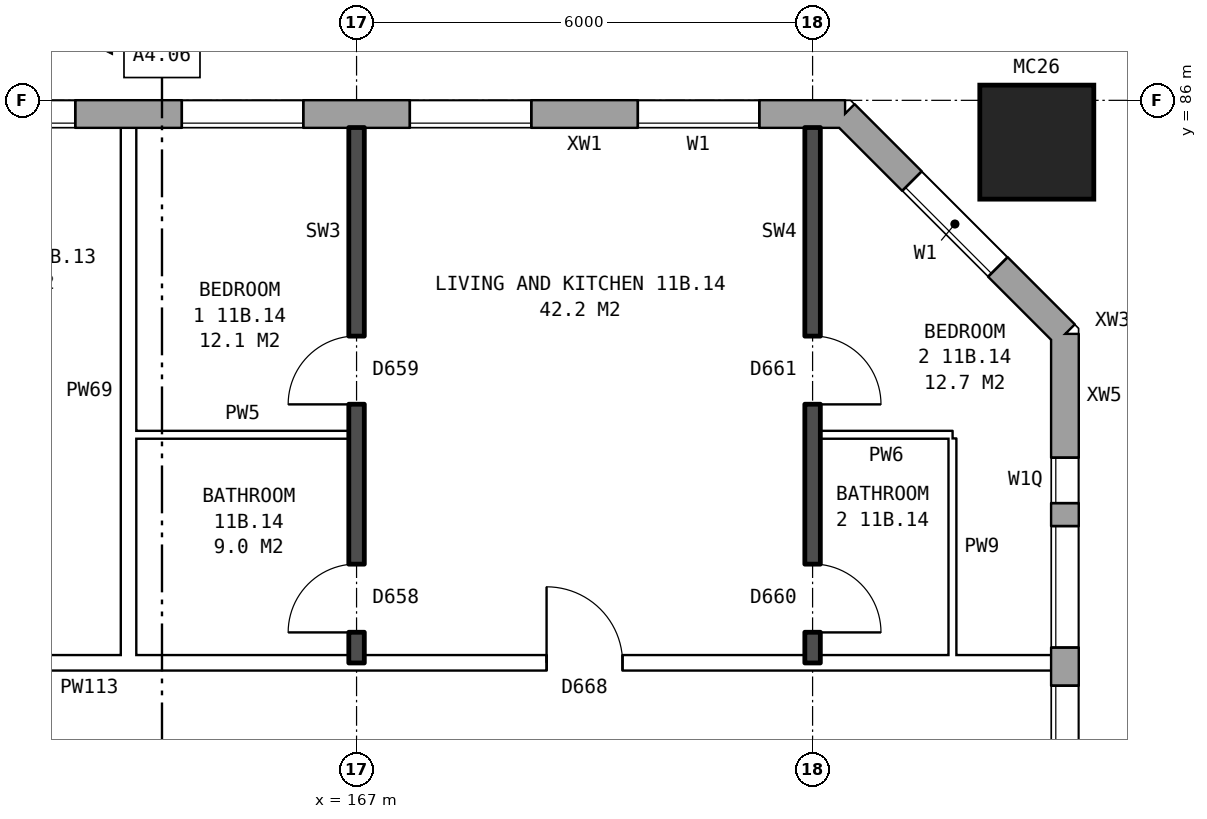
"""IFC4 building model, lengths in metres.
Left out: names, types, materials, properties, quantities, classifications, styles, units other than length and angle.
Written with IfcOpenShell. Run it as: python <this file> out.ifc"""

import sys

from ifc_helpers import new_model, si_unit, direction, frame, frame_2d, origin, origin_2d, place, context, subcontext, project, spatial, rectangle, hollow_rectangle, extrude, element, fill, save


model = new_model("IFC4")
c1 = context("Model", 3, precision=1e-05, world=origin(), true_north=direction((0.0, 1.0)))
c2 = subcontext(c1, "Body", "Model", "MODEL_VIEW")
j1 = project(units=[si_unit("LENGTHUNIT", "METRE"), si_unit("PLANEANGLEUNIT", "RADIAN")], contexts=[c1])
p1 = place(None, origin())
s1 = spatial("IfcSite", under=j1, at=p1, CompositionType="ELEMENT")
p2 = place(p1, origin())
s2 = spatial("IfcBuilding", under=s1, at=p2, CompositionType="ELEMENT")
p3 = place(p2, frame((0.0, 0.0, 44.3)))
s3 = spatial("IfcBuildingStorey", under=s2, at=p3, CompositionType="ELEMENT", Elevation=44.3)
p4 = place(p3, frame((175.95, 85.45, 0.0), z_axis=(0.0, 0.0, 1.0), x_axis=(1.0, 0.0, 0.0)))
e1 = element("IfcColumn", 1, at=p4, inside=s3, PredefinedType="COLUMN", context=c2, shape_type="SweptSolid", body=[
    extrude(hollow_rectangle(XDim=1.5, YDim=1.5, WallThickness=0.08, at=origin_2d()), origin(), (0.0, 0.0, 1.0), 3.1),
])
p5 = place(p3, frame((176.32, 57.075, 0.0), z_axis=(0.0, 0.0, 1.0), x_axis=(0.0, 1.0, 0.0)))
e2 = element("IfcWall", 2, at=p5, inside=s3, PredefinedType="STANDARD", context=c2, shape_type="SweptSolid", body=[
    extrude(rectangle(XDim=25.851, YDim=0.36, at=frame_2d((12.925, 0.0))), origin(), (0.0, 0.0, 1.0), 2.85),
])
p6 = place(p5, frame((0.95, 0.0, 0.8)))
e3 = element("IfcOpeningElement", 3, at=p6, cuts=e2, PredefinedType="OPENING", context=c2, shape_type="SweptSolid", body=[
    extrude(rectangle(XDim=1.2, YDim=0.9, at=frame_2d((0.6, 0.45))), frame((0.0, 0.19, 0.0), z_axis=(0.0, -1.0, 0.0), x_axis=(1.0, 0.0, 0.0)), (0.0, 0.0, 1.0), 0.38),
])
p7 = place(p5, frame((4.625, 0.0, 0.8)))
e4 = element("IfcOpeningElement", 4, at=p7, cuts=e2, PredefinedType="OPENING", context=c2, shape_type="SweptSolid", body=[
    extrude(rectangle(XDim=1.6, YDim=1.8, at=frame_2d((0.8, 0.9))), frame((0.0, 0.19, 0.0), z_axis=(0.0, -1.0, 0.0), x_axis=(1.0, 0.0, 0.0)), (0.0, 0.0, 1.0), 0.38),
])
p8 = place(p5, frame((7.625, 0.0, 0.8)))
e5 = element("IfcOpeningElement", 5, at=p8, cuts=e2, PredefinedType="OPENING", context=c2, shape_type="SweptSolid", body=[
    extrude(rectangle(XDim=1.6, YDim=1.8, at=frame_2d((0.8, 0.9))), frame((0.0, 0.19, 0.0), z_axis=(0.0, -1.0, 0.0), x_axis=(1.0, 0.0, 0.0)), (0.0, 0.0, 1.0), 0.38),
])
p9 = place(p5, frame((10.625, 0.0, 0.8)))
e6 = element("IfcOpeningElement", 6, at=p9, cuts=e2, PredefinedType="OPENING", context=c2, shape_type="SweptSolid", body=[
    extrude(rectangle(XDim=1.6, YDim=1.8, at=frame_2d((0.8, 0.9))), frame((0.0, 0.19, 0.0), z_axis=(0.0, -1.0, 0.0), x_axis=(1.0, 0.0, 0.0)), (0.0, 0.0, 1.0), 0.38),
])
p10 = place(p5, frame((13.625, 0.0, 0.8)))
e7 = element("IfcOpeningElement", 7, at=p10, cuts=e2, PredefinedType="OPENING", context=c2, shape_type="SweptSolid", body=[
    extrude(rectangle(XDim=1.6, YDim=1.8, at=frame_2d((0.8, 0.9))), frame((0.0, 0.19, 0.0), z_axis=(0.0, -1.0, 0.0), x_axis=(1.0, 0.0, 0.0)), (0.0, 0.0, 1.0), 0.38),
])
p11 = place(p5, frame((16.625, 0.0, 0.8)))
e8 = element("IfcOpeningElement", 8, at=p11, cuts=e2, PredefinedType="OPENING", context=c2, shape_type="SweptSolid", body=[
    extrude(rectangle(XDim=1.6, YDim=1.8, at=frame_2d((0.8, 0.9))), frame((0.0, 0.19, 0.0), z_axis=(0.0, -1.0, 0.0), x_axis=(1.0, 0.0, 0.0)), (0.0, 0.0, 1.0), 0.38),
])
p12 = place(p5, frame((19.625, 0.0, 0.8)))
e9 = element("IfcOpeningElement", 9, at=p12, cuts=e2, PredefinedType="OPENING", context=c2, shape_type="SweptSolid", body=[
    extrude(rectangle(XDim=1.6, YDim=1.8, at=frame_2d((0.8, 0.9))), frame((0.0, 0.19, 0.0), z_axis=(0.0, -1.0, 0.0), x_axis=(1.0, 0.0, 0.0)), (0.0, 0.0, 1.0), 0.38),
])
p13 = place(p5, frame((21.725, 0.0, 0.8)))
e10 = element("IfcOpeningElement", 10, at=p13, cuts=e2, PredefinedType="OPENING", context=c2, shape_type="SweptSolid", body=[
    extrude(rectangle(XDim=1.6, YDim=1.8, at=frame_2d((0.8, 0.9))), frame((0.0, 0.19, 0.0), z_axis=(0.0, -1.0, 0.0), x_axis=(1.0, 0.0, 0.0)), (0.0, 0.0, 1.0), 0.38),
])
p14 = place(p5, frame((2.5, 0.0, 0.8)))
e11 = element("IfcOpeningElement", 11, at=p14, cuts=e2, PredefinedType="OPENING", context=c2, shape_type="SweptSolid", body=[
    extrude(rectangle(XDim=1.4, YDim=1.8, at=frame_2d((0.7, 0.9))), frame((0.0, 0.19, 0.0), z_axis=(0.0, -1.0, 0.0), x_axis=(1.0, 0.0, 0.0)), (0.0, 0.0, 1.0), 0.38),
])
p15 = place(p5, frame((23.625, 0.0, 0.8)))
e12 = element("IfcOpeningElement", 12, at=p15, cuts=e2, PredefinedType="OPENING", context=c2, shape_type="SweptSolid", body=[
    extrude(rectangle(XDim=0.6, YDim=1.2, at=frame_2d((0.3, 0.6))), frame((0.0, 0.19, 0.0), z_axis=(0.0, -1.0, 0.0), x_axis=(1.0, 0.0, 0.0)), (0.0, 0.0, 1.0), 0.38),
])
p16 = place(p3, frame((176.32, 82.925, 0.0), z_axis=(0.0, 0.0, 1.0), x_axis=(-0.707106781187, 0.707106781187, 0.0)))
e13 = element("IfcWall", 13, at=p16, inside=s3, PredefinedType="STANDARD", context=c2, shape_type="SweptSolid", body=[
    extrude(rectangle(XDim=4.094, YDim=0.36, at=frame_2d((2.047, 0.0))), origin(), (0.0, 0.0, 1.0), 2.85),
])
p17 = place(p16, frame((1.247, 0.0, 0.8)))
e14 = element("IfcOpeningElement", 14, at=p17, cuts=e13, PredefinedType="OPENING", context=c2, shape_type="SweptSolid", body=[
    extrude(rectangle(XDim=1.6, YDim=1.8, at=frame_2d((0.8, 0.9))), frame((0.0, 0.19, 0.0), z_axis=(0.0, -1.0, 0.0), x_axis=(1.0, 0.0, 0.0)), (0.0, 0.0, 1.0), 0.38),
])
p18 = place(p3, frame((173.425, 85.82, 0.0), z_axis=(0.0, 0.0, 1.0), x_axis=(-1.0, 0.0, 0.0)))
e15 = element("IfcWall", 15, at=p18, inside=s3, PredefinedType="STANDARD", context=c2, shape_type="SweptSolid", body=[
    extrude(rectangle(XDim=39.351, YDim=0.36, at=frame_2d((19.675, 0.0))), origin(), (0.0, 0.0, 1.0), 2.85),
])
p19 = place(p18, frame((1.125, 0.0, 0.8)))
e16 = element("IfcOpeningElement", 16, at=p19, cuts=e15, PredefinedType="OPENING", context=c2, shape_type="SweptSolid", body=[
    extrude(rectangle(XDim=1.6, YDim=1.8, at=frame_2d((0.8, 0.9))), frame((0.0, 0.19, 0.0), z_axis=(0.0, -1.0, 0.0), x_axis=(1.0, 0.0, 0.0)), (0.0, 0.0, 1.0), 0.38),
])
p20 = place(p18, frame((4.125, 0.0, 0.8)))
e17 = element("IfcOpeningElement", 17, at=p20, cuts=e15, PredefinedType="OPENING", context=c2, shape_type="SweptSolid", body=[
    extrude(rectangle(XDim=1.6, YDim=1.8, at=frame_2d((0.8, 0.9))), frame((0.0, 0.19, 0.0), z_axis=(0.0, -1.0, 0.0), x_axis=(1.0, 0.0, 0.0)), (0.0, 0.0, 1.0), 0.38),
])
p21 = place(p18, frame((7.125, 0.0, 0.8)))
e18 = element("IfcOpeningElement", 18, at=p21, cuts=e15, PredefinedType="OPENING", context=c2, shape_type="SweptSolid", body=[
    extrude(rectangle(XDim=1.6, YDim=1.8, at=frame_2d((0.8, 0.9))), frame((0.0, 0.19, 0.0), z_axis=(0.0, -1.0, 0.0), x_axis=(1.0, 0.0, 0.0)), (0.0, 0.0, 1.0), 0.38),
])
p22 = place(p18, frame((10.125, 0.0, 0.8)))
e19 = element("IfcOpeningElement", 19, at=p22, cuts=e15, PredefinedType="OPENING", context=c2, shape_type="SweptSolid", body=[
    extrude(rectangle(XDim=1.6, YDim=1.8, at=frame_2d((0.8, 0.9))), frame((0.0, 0.19, 0.0), z_axis=(0.0, -1.0, 0.0), x_axis=(1.0, 0.0, 0.0)), (0.0, 0.0, 1.0), 0.38),
])
p23 = place(p18, frame((13.125, 0.0, 0.8)))
e20 = element("IfcOpeningElement", 20, at=p23, cuts=e15, PredefinedType="OPENING", context=c2, shape_type="SweptSolid", body=[
    extrude(rectangle(XDim=1.6, YDim=1.8, at=frame_2d((0.8, 0.9))), frame((0.0, 0.19, 0.0), z_axis=(0.0, -1.0, 0.0), x_axis=(1.0, 0.0, 0.0)), (0.0, 0.0, 1.0), 0.38),
])
p24 = place(p18, frame((16.125, 0.0, 0.8)))
e21 = element("IfcOpeningElement", 21, at=p24, cuts=e15, PredefinedType="OPENING", context=c2, shape_type="SweptSolid", body=[
    extrude(rectangle(XDim=1.6, YDim=1.8, at=frame_2d((0.8, 0.9))), frame((0.0, 0.19, 0.0), z_axis=(0.0, -1.0, 0.0), x_axis=(1.0, 0.0, 0.0)), (0.0, 0.0, 1.0), 0.38),
])
p25 = place(p18, frame((19.125, 0.0, 0.8)))
e22 = element("IfcOpeningElement", 22, at=p25, cuts=e15, PredefinedType="OPENING", context=c2, shape_type="SweptSolid", body=[
    extrude(rectangle(XDim=1.6, YDim=1.8, at=frame_2d((0.8, 0.9))), frame((0.0, 0.19, 0.0), z_axis=(0.0, -1.0, 0.0), x_axis=(1.0, 0.0, 0.0)), (0.0, 0.0, 1.0), 0.38),
])
p26 = place(p18, frame((22.125, 0.0, 0.8)))
e23 = element("IfcOpeningElement", 23, at=p26, cuts=e15, PredefinedType="OPENING", context=c2, shape_type="SweptSolid", body=[
    extrude(rectangle(XDim=1.6, YDim=1.8, at=frame_2d((0.8, 0.9))), frame((0.0, 0.19, 0.0), z_axis=(0.0, -1.0, 0.0), x_axis=(1.0, 0.0, 0.0)), (0.0, 0.0, 1.0), 0.38),
])
p27 = place(p18, frame((25.125, 0.0, 0.8)))
e24 = element("IfcOpeningElement", 24, at=p27, cuts=e15, PredefinedType="OPENING", context=c2, shape_type="SweptSolid", body=[
    extrude(rectangle(XDim=1.6, YDim=1.8, at=frame_2d((0.8, 0.9))), frame((0.0, 0.19, 0.0), z_axis=(0.0, -1.0, 0.0), x_axis=(1.0, 0.0, 0.0)), (0.0, 0.0, 1.0), 0.38),
])
p28 = place(p18, frame((28.125, 0.0, 0.8)))
e25 = element("IfcOpeningElement", 25, at=p28, cuts=e15, PredefinedType="OPENING", context=c2, shape_type="SweptSolid", body=[
    extrude(rectangle(XDim=1.6, YDim=1.8, at=frame_2d((0.8, 0.9))), frame((0.0, 0.19, 0.0), z_axis=(0.0, -1.0, 0.0), x_axis=(1.0, 0.0, 0.0)), (0.0, 0.0, 1.0), 0.38),
])
p29 = place(p18, frame((31.125, 0.0, 0.8)))
e26 = element("IfcOpeningElement", 26, at=p29, cuts=e15, PredefinedType="OPENING", context=c2, shape_type="SweptSolid", body=[
    extrude(rectangle(XDim=1.6, YDim=1.8, at=frame_2d((0.8, 0.9))), frame((0.0, 0.19, 0.0), z_axis=(0.0, -1.0, 0.0), x_axis=(1.0, 0.0, 0.0)), (0.0, 0.0, 1.0), 0.38),
])
p30 = place(p18, frame((34.125, 0.0, 0.8)))
e27 = element("IfcOpeningElement", 27, at=p30, cuts=e15, PredefinedType="OPENING", context=c2, shape_type="SweptSolid", body=[
    extrude(rectangle(XDim=1.6, YDim=1.8, at=frame_2d((0.8, 0.9))), frame((0.0, 0.19, 0.0), z_axis=(0.0, -1.0, 0.0), x_axis=(1.0, 0.0, 0.0)), (0.0, 0.0, 1.0), 0.38),
])
p31 = place(p18, frame((36.625, 0.0, 0.8)))
e28 = element("IfcOpeningElement", 28, at=p31, cuts=e15, PredefinedType="OPENING", context=c2, shape_type="SweptSolid", body=[
    extrude(rectangle(XDim=1.4, YDim=1.8, at=frame_2d((0.7, 0.9))), frame((0.0, 0.19, 0.0), z_axis=(0.0, -1.0, 0.0), x_axis=(1.0, 0.0, 0.0)), (0.0, 0.0, 1.0), 0.38),
])
p32 = place(p18, frame((38.325, 0.0, 0.8)))
e29 = element("IfcOpeningElement", 29, at=p32, cuts=e15, PredefinedType="OPENING", context=c2, shape_type="SweptSolid", body=[
    extrude(rectangle(XDim=0.6, YDim=0.9, at=frame_2d((0.3, 0.45))), frame((0.0, 0.19, 0.0), z_axis=(0.0, -1.0, 0.0), x_axis=(1.0, 0.0, 0.0)), (0.0, 0.0, 1.0), 0.38),
])
p33 = place(p3, frame((155.1, 78.6, 0.0), z_axis=(0.0, 0.0, 1.0), x_axis=(1.0, 0.0, 0.0)))
e30 = element("IfcWall", 30, at=p33, inside=s3, PredefinedType="PARTITIONING", context=c2, shape_type="SweptSolid", body=[
    extrude(rectangle(XDim=21.04, YDim=0.2, at=frame_2d((10.52, 0.0))), origin(), (0.0, 0.0, 1.0), 2.85),
])
p34 = place(p33, frame((2.45, 0.0, 0.0)))
e31 = element("IfcOpeningElement", 31, at=p34, cuts=e30, PredefinedType="OPENING", context=c2, shape_type="SweptSolid", body=[
    extrude(rectangle(XDim=1.0, YDim=2.1, at=frame_2d((0.5, 1.05))), frame((0.0, 0.11, 0.0), z_axis=(0.0, -1.0, 0.0), x_axis=(1.0, 0.0, 0.0)), (0.0, 0.0, 1.0), 0.22),
])
p35 = place(p33, frame((14.4, 0.0, 0.0)))
e32 = element("IfcOpeningElement", 32, at=p35, cuts=e30, PredefinedType="OPENING", context=c2, shape_type="SweptSolid", body=[
    extrude(rectangle(XDim=1.0, YDim=2.1, at=frame_2d((0.5, 1.05))), frame((0.0, 0.11, 0.0), z_axis=(0.0, -1.0, 0.0), x_axis=(1.0, 0.0, 0.0)), (0.0, 0.0, 1.0), 0.22),
])
p36 = place(p3, frame((164.1, 81.6, 0.0), z_axis=(0.0, 0.0, 1.0), x_axis=(1.0, 0.0, 0.0)))
e33 = element("IfcWall", 33, at=p36, inside=s3, PredefinedType="PARTITIONING", context=c2, shape_type="SweptSolid", body=[
    extrude(rectangle(XDim=2.8, YDim=0.1, at=frame_2d((1.4, 0.0))), origin(), (0.0, 0.0, 1.0), 2.85),
])
p37 = place(p3, frame((173.1, 81.6, 0.0), z_axis=(0.0, 0.0, 1.0), x_axis=(1.0, 0.0, 0.0)))
e34 = element("IfcWall", 34, at=p37, inside=s3, PredefinedType="PARTITIONING", context=c2, shape_type="SweptSolid", body=[
    extrude(rectangle(XDim=1.74, YDim=0.1, at=frame_2d((0.87, 0.0))), origin(), (0.0, 0.0, 1.0), 2.85),
])
p38 = place(p3, frame((164.0, 78.7, 0.0), z_axis=(0.0, 0.0, 1.0), x_axis=(0.0, 1.0, 0.0)))
e35 = element("IfcWall", 35, at=p38, inside=s3, PredefinedType="PARTITIONING", context=c2, shape_type="SweptSolid", body=[
    extrude(rectangle(XDim=6.94, YDim=0.2, at=frame_2d((3.47, 0.0))), origin(), (0.0, 0.0, 1.0), 2.85),
])
p39 = place(p3, frame((167.0, 78.6, 0.0), z_axis=(0.0, 0.0, 1.0), x_axis=(0.0, 1.0, 0.0)))
e36 = element("IfcWall", 36, at=p39, inside=s3, PredefinedType="SOLIDWALL", context=c2, shape_type="SweptSolid", body=[
    extrude(rectangle(XDim=7.04, YDim=0.2, at=frame_2d((3.52, 0.0))), origin(), (0.0, 0.0, 1.0), 2.85),
])
p40 = place(p39, frame((3.4, 0.0, 0.0)))
e37 = element("IfcOpeningElement", 37, at=p40, cuts=e36, PredefinedType="OPENING", context=c2, shape_type="SweptSolid", body=[
    extrude(rectangle(XDim=0.9, YDim=2.1, at=frame_2d((0.45, 1.05))), frame((0.0, 0.11, 0.0), z_axis=(0.0, -1.0, 0.0), x_axis=(1.0, 0.0, 0.0)), (0.0, 0.0, 1.0), 0.22),
])
p41 = place(p39, frame((0.4, 0.0, 0.0)))
e38 = element("IfcOpeningElement", 38, at=p41, cuts=e36, PredefinedType="OPENING", context=c2, shape_type="SweptSolid", body=[
    extrude(rectangle(XDim=0.9, YDim=2.1, at=frame_2d((0.45, 1.05))), frame((0.0, 0.11, 0.0), z_axis=(0.0, -1.0, 0.0), x_axis=(1.0, 0.0, 0.0)), (0.0, 0.0, 1.0), 0.22),
])
p42 = place(p3, frame((173.0, 78.6, 0.0), z_axis=(0.0, 0.0, 1.0), x_axis=(0.0, 1.0, 0.0)))
e39 = element("IfcWall", 39, at=p42, inside=s3, PredefinedType="SOLIDWALL", context=c2, shape_type="SweptSolid", body=[
    extrude(rectangle(XDim=7.04, YDim=0.2, at=frame_2d((3.52, 0.0))), origin(), (0.0, 0.0, 1.0), 2.85),
])
p43 = place(p42, frame((3.4, 0.0, 0.0)))
e40 = element("IfcOpeningElement", 40, at=p43, cuts=e39, PredefinedType="OPENING", context=c2, shape_type="SweptSolid", body=[
    extrude(rectangle(XDim=0.9, YDim=2.1, at=frame_2d((0.45, 1.05))), frame((0.0, 0.11, 0.0), z_axis=(0.0, -1.0, 0.0), x_axis=(1.0, 0.0, 0.0)), (0.0, 0.0, 1.0), 0.22),
])
p44 = place(p42, frame((0.4, 0.0, 0.0)))
e41 = element("IfcOpeningElement", 41, at=p44, cuts=e39, PredefinedType="OPENING", context=c2, shape_type="SweptSolid", body=[
    extrude(rectangle(XDim=0.9, YDim=2.1, at=frame_2d((0.45, 1.05))), frame((0.0, 0.11, 0.0), z_axis=(0.0, -1.0, 0.0), x_axis=(1.0, 0.0, 0.0)), (0.0, 0.0, 1.0), 0.22),
])
p45 = place(p3, frame((174.84, 78.7, 0.0), z_axis=(0.0, 0.0, 1.0), x_axis=(0.0, 1.0, 0.0)))
e42 = element("IfcWall", 42, at=p45, inside=s3, PredefinedType="PARTITIONING", context=c2, shape_type="SweptSolid", body=[
    extrude(rectangle(XDim=2.85, YDim=0.1, at=frame_2d((1.425, 0.0))), origin(), (0.0, 0.0, 1.0), 2.85),
])
p46 = place(p12, origin())
e43 = element("IfcWindow", 43, at=p46, inside=s3, PartitioningType="SINGLE_PANEL", PredefinedType="WINDOW", context=c2, shape_type="SweptSolid", body=[
    extrude(rectangle(XDim=1.6, YDim=1.8, at=frame_2d((0.8, 0.9))), frame((0.0, 0.15, 0.0), z_axis=(0.0, -1.0, 0.0), x_axis=(1.0, 0.0, 0.0)), (0.0, 0.0, 1.0), 0.06),
])
fill(e9, e43)
p47 = place(p13, origin())
e44 = element("IfcWindow", 44, at=p47, inside=s3, PartitioningType="SINGLE_PANEL", PredefinedType="WINDOW", context=c2, shape_type="SweptSolid", body=[
    extrude(rectangle(XDim=1.6, YDim=1.8, at=frame_2d((0.8, 0.9))), frame((0.0, 0.15, 0.0), z_axis=(0.0, -1.0, 0.0), x_axis=(1.0, 0.0, 0.0)), (0.0, 0.0, 1.0), 0.06),
])
fill(e10, e44)
p48 = place(p17, origin())
e45 = element("IfcWindow", 45, at=p48, inside=s3, PartitioningType="SINGLE_PANEL", PredefinedType="WINDOW", context=c2, shape_type="SweptSolid", body=[
    extrude(rectangle(XDim=1.6, YDim=1.8, at=frame_2d((0.8, 0.9))), frame((0.0, 0.15, 0.0), z_axis=(0.0, -1.0, 0.0), x_axis=(1.0, 0.0, 0.0)), (0.0, 0.0, 1.0), 0.06),
])
fill(e14, e45)
p49 = place(p19, origin())
e46 = element("IfcWindow", 46, at=p49, inside=s3, PartitioningType="SINGLE_PANEL", PredefinedType="WINDOW", context=c2, shape_type="SweptSolid", body=[
    extrude(rectangle(XDim=1.6, YDim=1.8, at=frame_2d((0.8, 0.9))), frame((0.0, 0.15, 0.0), z_axis=(0.0, -1.0, 0.0), x_axis=(1.0, 0.0, 0.0)), (0.0, 0.0, 1.0), 0.06),
])
fill(e16, e46)
p50 = place(p20, origin())
e47 = element("IfcWindow", 47, at=p50, inside=s3, PartitioningType="SINGLE_PANEL", PredefinedType="WINDOW", context=c2, shape_type="SweptSolid", body=[
    extrude(rectangle(XDim=1.6, YDim=1.8, at=frame_2d((0.8, 0.9))), frame((0.0, 0.15, 0.0), z_axis=(0.0, -1.0, 0.0), x_axis=(1.0, 0.0, 0.0)), (0.0, 0.0, 1.0), 0.06),
])
fill(e17, e47)
p51 = place(p21, origin())
e48 = element("IfcWindow", 48, at=p51, inside=s3, PartitioningType="SINGLE_PANEL", PredefinedType="WINDOW", context=c2, shape_type="SweptSolid", body=[
    extrude(rectangle(XDim=1.6, YDim=1.8, at=frame_2d((0.8, 0.9))), frame((0.0, 0.15, 0.0), z_axis=(0.0, -1.0, 0.0), x_axis=(1.0, 0.0, 0.0)), (0.0, 0.0, 1.0), 0.06),
])
fill(e18, e48)
p52 = place(p22, origin())
e49 = element("IfcWindow", 49, at=p52, inside=s3, PartitioningType="SINGLE_PANEL", PredefinedType="WINDOW", context=c2, shape_type="SweptSolid", body=[
    extrude(rectangle(XDim=1.6, YDim=1.8, at=frame_2d((0.8, 0.9))), frame((0.0, 0.15, 0.0), z_axis=(0.0, -1.0, 0.0), x_axis=(1.0, 0.0, 0.0)), (0.0, 0.0, 1.0), 0.06),
])
fill(e19, e49)
p53 = place(p40, origin())
e50 = element("IfcDoor", 50, at=p53, inside=s3, OperationType="SINGLE_SWING_LEFT", PredefinedType="DOOR", context=c2, shape_type="SweptSolid", body=[
    extrude(rectangle(XDim=0.9, YDim=2.1, at=frame_2d((0.45, 1.05))), frame((0.0, 0.025, 0.0), z_axis=(0.0, -1.0, 0.0), x_axis=(1.0, 0.0, 0.0)), (0.0, 0.0, 1.0), 0.05),
])
fill(e37, e50)
p54 = place(p43, frame((0.9, 0.0, 0.0), z_axis=(0.0, 0.0, 1.0), x_axis=(-1.0, 0.0, 0.0)))
e51 = element("IfcDoor", 51, at=p54, inside=s3, OperationType="SINGLE_SWING_RIGHT", PredefinedType="DOOR", context=c2, shape_type="SweptSolid", body=[
    extrude(rectangle(XDim=0.9, YDim=2.1, at=frame_2d((0.45, 1.05))), frame((0.0, 0.025, 0.0), z_axis=(0.0, -1.0, 0.0), x_axis=(1.0, 0.0, 0.0)), (0.0, 0.0, 1.0), 0.05),
])
fill(e40, e51)
p55 = place(p35, origin())
e52 = element("IfcDoor", 52, at=p55, inside=s3, OperationType="SINGLE_SWING_LEFT", PredefinedType="DOOR", context=c2, shape_type="SweptSolid", body=[
    extrude(rectangle(XDim=1.0, YDim=2.1, at=frame_2d((0.5, 1.05))), frame((0.0, 0.025, 0.0), z_axis=(0.0, -1.0, 0.0), x_axis=(1.0, 0.0, 0.0)), (0.0, 0.0, 1.0), 0.05),
])
fill(e32, e52)
p56 = place(p41, origin())
e53 = element("IfcDoor", 53, at=p56, inside=s3, OperationType="SINGLE_SWING_LEFT", PredefinedType="DOOR", context=c2, shape_type="SweptSolid", body=[
    extrude(rectangle(XDim=0.9, YDim=2.1, at=frame_2d((0.45, 1.05))), frame((0.0, 0.025, 0.0), z_axis=(0.0, -1.0, 0.0), x_axis=(1.0, 0.0, 0.0)), (0.0, 0.0, 1.0), 0.05),
])
fill(e38, e53)
p57 = place(p44, frame((0.9, 0.0, 0.0), z_axis=(0.0, 0.0, 1.0), x_axis=(-1.0, 0.0, 0.0)))
e54 = element("IfcDoor", 54, at=p57, inside=s3, OperationType="SINGLE_SWING_RIGHT", PredefinedType="DOOR", context=c2, shape_type="SweptSolid", body=[
    extrude(rectangle(XDim=0.9, YDim=2.1, at=frame_2d((0.45, 1.05))), frame((0.0, 0.025, 0.0), z_axis=(0.0, -1.0, 0.0), x_axis=(1.0, 0.0, 0.0)), (0.0, 0.0, 1.0), 0.05),
])
fill(e41, e54)
p58 = place(p15, origin())
e55 = element("IfcWindow", 55, at=p58, inside=s3, PartitioningType="SINGLE_PANEL", PredefinedType="WINDOW", context=c2, shape_type="SweptSolid", body=[
    extrude(rectangle(XDim=0.6, YDim=1.2, at=frame_2d((0.3, 0.6))), frame((0.0, 0.15, 0.0), z_axis=(0.0, -1.0, 0.0), x_axis=(1.0, 0.0, 0.0)), (0.0, 0.0, 1.0), 0.06),
])
fill(e12, e55)
save(model, sys.argv[1])
